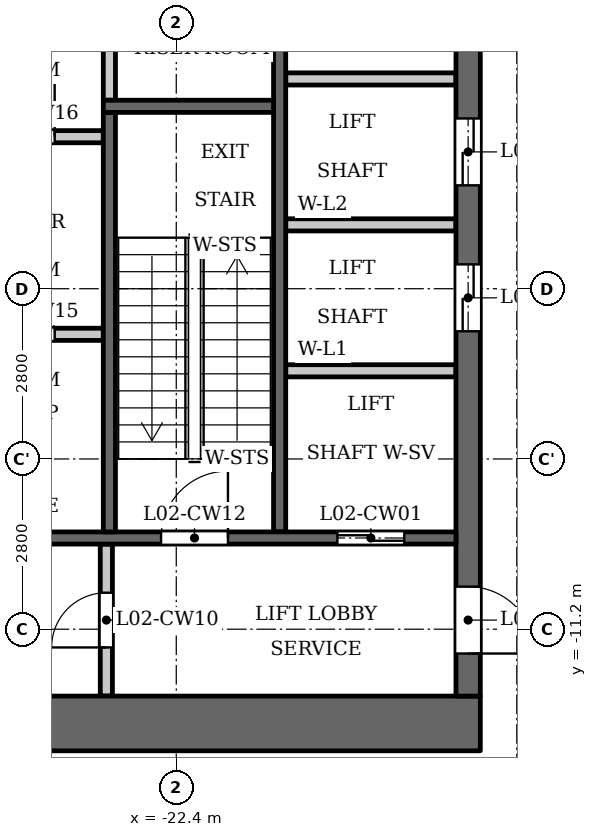
"""IFC4 building model, lengths in metres.
Left out: names, types, materials, properties, quantities, classifications, styles, units other than length and angle.
Written with IfcOpenShell. Run it as: python <this file> out.ifc"""

import sys

from ifc_helpers import new_model, si_unit, direction, frame, frame_2d, origin, place, context, subcontext, project, spatial, rectangle, extrude, element, fill, save


model = new_model("IFC4")
c1 = context("Model", 3, precision=1e-05, world=origin(), true_north=direction((0.0, 1.0)))
c2 = subcontext(c1, "Body", "Model", "MODEL_VIEW")
j1 = project(units=[si_unit("LENGTHUNIT", "METRE"), si_unit("PLANEANGLEUNIT", "RADIAN")], contexts=[c1])
p1 = place(None, origin())
s1 = spatial("IfcSite", under=j1, at=p1, CompositionType="ELEMENT")
p2 = place(p1, origin())
s2 = spatial("IfcBuilding", under=s1, at=p2, CompositionType="ELEMENT")
p3 = place(p2, frame((0.0, 0.0, 11.3)))
s3 = spatial("IfcBuildingStorey", under=s2, at=p3, CompositionType="ELEMENT", Elevation=11.3)
p4 = place(p3, frame((-23.5, -2.5, 0.0), z_axis=(0.0, 0.0, 1.0), x_axis=(0.0, 1.0, 0.0)))
e1 = element("IfcWall", 1, at=p4, inside=s3, PredefinedType="PARTITIONING", context=c2, shape_type="SweptSolid", body=[
    extrude(rectangle(XDim=2.65, YDim=0.2, at=frame_2d((1.325, 0.0))), origin(), (0.0, 0.0, 1.0), 4.45),
])
p5 = place(p3, frame((-20.7, -9.6, 0.0), z_axis=(0.0, 0.0, 1.0), x_axis=(0.0, 1.0, 0.0)))
e2 = element("IfcWall", 2, at=p5, inside=s3, PredefinedType="SHEAR", context=c2, shape_type="SweptSolid", body=[
    extrude(rectangle(XDim=9.75, YDim=0.2, at=frame_2d((4.875, 0.0))), origin(), (0.0, 0.0, 1.0), 4.45),
])
p6 = place(p3, frame((-17.4, -12.75, 0.0), z_axis=(0.0, 0.0, 1.0), x_axis=(-1.0, 0.0, 0.0)))
e3 = element("IfcWall", 3, at=p6, inside=s3, PredefinedType="SHEAR", context=c2, shape_type="SweptSolid", body=[
    extrude(rectangle(XDim=10.4, YDim=0.9, at=frame_2d((5.2, 0.0))), origin(), (0.0, 0.0, 1.0), 4.45),
])
p7 = place(p3, frame((-17.6, -12.3, 0.0), z_axis=(0.0, 0.0, 1.0), x_axis=(0.0, 1.0, 0.0)))
e4 = element("IfcWall", 4, at=p7, inside=s3, PredefinedType="SHEAR", context=c2, shape_type="SweptSolid", body=[
    extrude(rectangle(XDim=24.6, YDim=0.4, at=frame_2d((12.3, 0.0))), origin(), (0.0, 0.0, 1.0), 4.45),
])
p8 = place(p7, frame((6.0, 0.0, 0.0)))
e5 = element("IfcOpeningElement", 5, at=p8, cuts=e4, PredefinedType="OPENING", context=c2, shape_type="SweptSolid", body=[
    extrude(rectangle(XDim=1.1, YDim=2.1, at=frame_2d((0.55, 1.05))), frame((0.0, 0.21, 0.0), z_axis=(0.0, -1.0, 0.0), x_axis=(1.0, 0.0, 0.0)), (0.0, 0.0, 1.0), 0.42),
])
p9 = place(p7, frame((8.4, 0.0, 0.0)))
e6 = element("IfcOpeningElement", 6, at=p9, cuts=e4, PredefinedType="OPENING", context=c2, shape_type="SweptSolid", body=[
    extrude(rectangle(XDim=1.1, YDim=2.1, at=frame_2d((0.55, 1.05))), frame((0.0, 0.21, 0.0), z_axis=(0.0, -1.0, 0.0), x_axis=(1.0, 0.0, 0.0)), (0.0, 0.0, 1.0), 0.42),
])
p10 = place(p7, frame((10.8, 0.0, 0.0)))
e7 = element("IfcOpeningElement", 7, at=p10, cuts=e4, PredefinedType="OPENING", context=c2, shape_type="SweptSolid", body=[
    extrude(rectangle(XDim=1.1, YDim=2.1, at=frame_2d((0.55, 1.05))), frame((0.0, 0.21, 0.0), z_axis=(0.0, -1.0, 0.0), x_axis=(1.0, 0.0, 0.0)), (0.0, 0.0, 1.0), 0.42),
])
p11 = place(p7, frame((16.75, 0.0, 0.0)))
e8 = element("IfcOpeningElement", 8, at=p11, cuts=e4, PredefinedType="OPENING", context=c2, shape_type="SweptSolid", body=[
    extrude(rectangle(XDim=0.9, YDim=2.1, at=frame_2d((0.45, 1.05))), frame((0.0, 0.21, 0.0), z_axis=(0.0, -1.0, 0.0), x_axis=(1.0, 0.0, 0.0)), (0.0, 0.0, 1.0), 0.42),
])
p12 = place(p7, frame((22.8, 0.0, 0.0)))
e9 = element("IfcOpeningElement", 9, at=p12, cuts=e4, PredefinedType="OPENING", context=c2, shape_type="SweptSolid", body=[
    extrude(rectangle(XDim=1.1, YDim=2.1, at=frame_2d((0.55, 1.05))), frame((0.0, 0.21, 0.0), z_axis=(0.0, -1.0, 0.0), x_axis=(1.0, 0.0, 0.0)), (0.0, 0.0, 1.0), 0.42),
])
p13 = place(p7, frame((0.7, 0.0, 0.0)))
e10 = element("IfcOpeningElement", 10, at=p13, cuts=e4, PredefinedType="OPENING", context=c2, shape_type="SweptSolid", body=[
    extrude(rectangle(XDim=1.1, YDim=2.1, at=frame_2d((0.55, 1.05))), frame((0.0, 0.21, 0.0), z_axis=(0.0, -1.0, 0.0), x_axis=(1.0, 0.0, 0.0)), (0.0, 0.0, 1.0), 0.42),
])
p14 = place(p7, frame((12.775, 0.0, 0.0)))
e11 = element("IfcOpeningElement", 11, at=p14, cuts=e4, PredefinedType="OPENING", context=c2, shape_type="SweptSolid", body=[
    extrude(rectangle(XDim=1.8, YDim=2.1, at=frame_2d((0.9, 1.05))), frame((0.0, 0.21, 0.0), z_axis=(0.0, -1.0, 0.0), x_axis=(1.0, 0.0, 0.0)), (0.0, 0.0, 1.0), 0.42),
])
p15 = place(p3, frame((-23.55, -12.3, 0.0), z_axis=(0.0, 0.0, 1.0), x_axis=(0.0, 1.0, 0.0)))
e12 = element("IfcWall", 12, at=p15, inside=s3, PredefinedType="PARTITIONING", context=c2, shape_type="SweptSolid", body=[
    extrude(rectangle(XDim=2.5, YDim=0.2, at=frame_2d((1.25, 0.0))), origin(), (0.0, 0.0, 1.0), 4.45),
])
p16 = place(p15, frame((0.8, 0.0, 0.0)))
e13 = element("IfcOpeningElement", 13, at=p16, cuts=e12, PredefinedType="OPENING", context=c2, shape_type="SweptSolid", body=[
    extrude(rectangle(XDim=0.9, YDim=2.1, at=frame_2d((0.45, 1.05))), frame((0.0, 0.11, 0.0), z_axis=(0.0, -1.0, 0.0), x_axis=(1.0, 0.0, 0.0)), (0.0, 0.0, 1.0), 0.22),
])
p17 = place(p3, frame((-23.6, -6.35, 0.0), z_axis=(0.0, 0.0, 1.0), x_axis=(-1.0, 0.0, 0.0)))
e14 = element("IfcWall", 14, at=p17, inside=s3, PredefinedType="PARTITIONING", context=c2, shape_type="SweptSolid", body=[
    extrude(rectangle(XDim=2.5, YDim=0.2, at=frame_2d((1.25, 0.0))), origin(), (0.0, 0.0, 1.0), 4.45),
])
p18 = place(p17, frame((0.8, 0.0, 0.0)))
e15 = element("IfcOpeningElement", 15, at=p18, cuts=e14, PredefinedType="OPENING", context=c2, shape_type="SweptSolid", body=[
    extrude(rectangle(XDim=0.9, YDim=2.1, at=frame_2d((0.45, 1.05))), frame((0.0, 0.11, 0.0), z_axis=(0.0, -1.0, 0.0), x_axis=(1.0, 0.0, 0.0)), (0.0, 0.0, 1.0), 0.22),
])
p19 = place(p3, frame((-23.6, -3.1, 0.0), z_axis=(0.0, 0.0, 1.0), x_axis=(-1.0, 0.0, 0.0)))
e16 = element("IfcWall", 16, at=p19, inside=s3, PredefinedType="PARTITIONING", context=c2, shape_type="SweptSolid", body=[
    extrude(rectangle(XDim=2.5, YDim=0.2, at=frame_2d((1.25, 0.0))), origin(), (0.0, 0.0, 1.0), 4.45),
])
p20 = place(p19, frame((0.8, 0.0, 0.0)))
e17 = element("IfcOpeningElement", 17, at=p20, cuts=e16, PredefinedType="OPENING", context=c2, shape_type="SweptSolid", body=[
    extrude(rectangle(XDim=0.9, YDim=2.1, at=frame_2d((0.45, 1.05))), frame((0.0, 0.11, 0.0), z_axis=(0.0, -1.0, 0.0), x_axis=(1.0, 0.0, 0.0)), (0.0, 0.0, 1.0), 0.22),
])
p21 = place(p3, frame((-17.8, -9.7, 0.0), z_axis=(0.0, 0.0, 1.0), x_axis=(-1.0, 0.0, 0.0)))
e18 = element("IfcWall", 18, at=p21, inside=s3, PredefinedType="SHEAR", context=c2, shape_type="SweptSolid", body=[
    extrude(rectangle(XDim=8.3, YDim=0.2, at=frame_2d((4.15, 0.0))), origin(), (0.0, 0.0, 1.0), 4.45),
])
p22 = place(p21, frame((0.85, 0.0, 0.0)))
e19 = element("IfcOpeningElement", 19, at=p22, cuts=e18, PredefinedType="OPENING", context=c2, shape_type="SweptSolid", body=[
    extrude(rectangle(XDim=1.1, YDim=2.1, at=frame_2d((0.55, 1.05))), frame((0.0, 0.11, 0.0), z_axis=(0.0, -1.0, 0.0), x_axis=(1.0, 0.0, 0.0)), (0.0, 0.0, 1.0), 0.22),
])
p23 = place(p21, frame((3.75, 0.0, 0.0)))
e20 = element("IfcOpeningElement", 20, at=p23, cuts=e18, PredefinedType="OPENING", context=c2, shape_type="SweptSolid", body=[
    extrude(rectangle(XDim=1.1, YDim=2.1, at=frame_2d((0.55, 1.05))), frame((0.0, 0.11, 0.0), z_axis=(0.0, -1.0, 0.0), x_axis=(1.0, 0.0, 0.0)), (0.0, 0.0, 1.0), 0.22),
])
for number, where, z_axis, x_axis in (
    (21, (-17.8, -6.95, 0.0), (0.0, 0.0, 1.0), (-1.0, 0.0, 0.0)),
    (22, (-17.8, -4.55, 0.0), (0.0, 0.0, 1.0), (-1.0, 0.0, 0.0)),
    (23, (-17.8, -2.15, 0.0), (0.0, 0.0, 1.0), (-1.0, 0.0, 0.0)),
):
    element("IfcWall", number, at=place(p3, frame(where, z_axis=z_axis, x_axis=x_axis)), inside=s3, PredefinedType="PARTITIONING", context=c2, shape_type="SweptSolid", body=[
        extrude(rectangle(XDim=2.8, YDim=0.2, at=frame_2d((1.4, 0.0))), origin(), (0.0, 0.0, 1.0), 4.45),
    ])
p24 = place(p3, frame((-23.5, -9.6, 0.0), z_axis=(0.0, 0.0, 1.0), x_axis=(0.0, 1.0, 0.0)))
e24 = element("IfcWall", 24, at=p24, inside=s3, PredefinedType="SHEAR", context=c2, shape_type="SweptSolid", body=[
    extrude(rectangle(XDim=6.9, YDim=0.2, at=frame_2d((3.45, 0.0))), origin(), (0.0, 0.0, 1.0), 4.45),
])
p25 = place(p3, frame((-20.8, -2.6, 0.0), z_axis=(0.0, 0.0, 1.0), x_axis=(-1.0, 0.0, 0.0)))
e25 = element("IfcWall", 25, at=p25, inside=s3, PredefinedType="SHEAR", context=c2, shape_type="SweptSolid", body=[
    extrude(rectangle(XDim=2.8, YDim=0.2, at=frame_2d((1.4, 0.0))), origin(), (0.0, 0.0, 1.0), 4.45),
])
p26 = place(p22, origin())
e26 = element("IfcDoor", 26, at=p26, inside=s3, OperationType="DOUBLE_DOOR_SLIDING", PredefinedType="DOOR", context=c2, shape_type="SweptSolid", body=[
    extrude(rectangle(XDim=1.1, YDim=2.1, at=frame_2d((0.55, 1.05))), frame((0.0, 0.025, 0.0), z_axis=(0.0, -1.0, 0.0), x_axis=(1.0, 0.0, 0.0)), (0.0, 0.0, 1.0), 0.05),
])
fill(e19, e26)
p27 = place(p8, origin())
e27 = element("IfcDoor", 27, at=p27, inside=s3, OperationType="DOUBLE_DOOR_SLIDING", PredefinedType="DOOR", context=c2, shape_type="SweptSolid", body=[
    extrude(rectangle(XDim=1.1, YDim=2.1, at=frame_2d((0.55, 1.05))), frame((0.0, 0.025, 0.0), z_axis=(0.0, -1.0, 0.0), x_axis=(1.0, 0.0, 0.0)), (0.0, 0.0, 1.0), 0.05),
])
fill(e5, e27)
p28 = place(p9, origin())
e28 = element("IfcDoor", 28, at=p28, inside=s3, OperationType="DOUBLE_DOOR_SLIDING", PredefinedType="DOOR", context=c2, shape_type="SweptSolid", body=[
    extrude(rectangle(XDim=1.1, YDim=2.1, at=frame_2d((0.55, 1.05))), frame((0.0, 0.025, 0.0), z_axis=(0.0, -1.0, 0.0), x_axis=(1.0, 0.0, 0.0)), (0.0, 0.0, 1.0), 0.05),
])
fill(e6, e28)
p29 = place(p13, origin())
e29 = element("IfcDoor", 29, at=p29, inside=s3, OperationType="SINGLE_SWING_LEFT", PredefinedType="DOOR", context=c2, shape_type="SweptSolid", body=[
    extrude(rectangle(XDim=1.1, YDim=2.1, at=frame_2d((0.55, 1.05))), frame((0.0, 0.025, 0.0), z_axis=(0.0, -1.0, 0.0), x_axis=(1.0, 0.0, 0.0)), (0.0, 0.0, 1.0), 0.05),
])
fill(e10, e29)
p30 = place(p16, origin())
e30 = element("IfcDoor", 30, at=p30, inside=s3, OperationType="SINGLE_SWING_RIGHT", PredefinedType="DOOR", context=c2, shape_type="SweptSolid", body=[
    extrude(rectangle(XDim=0.9, YDim=2.1, at=frame_2d((0.45, 1.05))), frame((0.0, 0.025, 0.0), z_axis=(0.0, -1.0, 0.0), x_axis=(1.0, 0.0, 0.0)), (0.0, 0.0, 1.0), 0.05),
])
fill(e13, e30)
p31 = place(p23, origin())
e31 = element("IfcDoor", 31, at=p31, inside=s3, OperationType="SINGLE_SWING_LEFT", PredefinedType="DOOR", context=c2, shape_type="SweptSolid", body=[
    extrude(rectangle(XDim=1.1, YDim=2.1, at=frame_2d((0.55, 1.05))), frame((0.0, 0.025, 0.0), z_axis=(0.0, -1.0, 0.0), x_axis=(1.0, 0.0, 0.0)), (0.0, 0.0, 1.0), 0.05),
])
fill(e20, e31)
p32 = place(p18, origin())
e32 = element("IfcDoor", 32, at=p32, inside=s3, OperationType="SINGLE_SWING_RIGHT", PredefinedType="DOOR", context=c2, shape_type="SweptSolid", body=[
    extrude(rectangle(XDim=0.9, YDim=2.1, at=frame_2d((0.45, 1.05))), frame((0.0, 0.025, 0.0), z_axis=(0.0, -1.0, 0.0), x_axis=(1.0, 0.0, 0.0)), (0.0, 0.0, 1.0), 0.05),
])
fill(e15, e32)
p33 = place(p20, origin())
e33 = element("IfcDoor", 33, at=p33, inside=s3, OperationType="SINGLE_SWING_LEFT", PredefinedType="DOOR", context=c2, shape_type="SweptSolid", body=[
    extrude(rectangle(XDim=0.9, YDim=2.1, at=frame_2d((0.45, 1.05))), frame((0.0, 0.025, 0.0), z_axis=(0.0, -1.0, 0.0), x_axis=(1.0, 0.0, 0.0)), (0.0, 0.0, 1.0), 0.05),
])
fill(e17, e33)
save(model, sys.argv[1])
